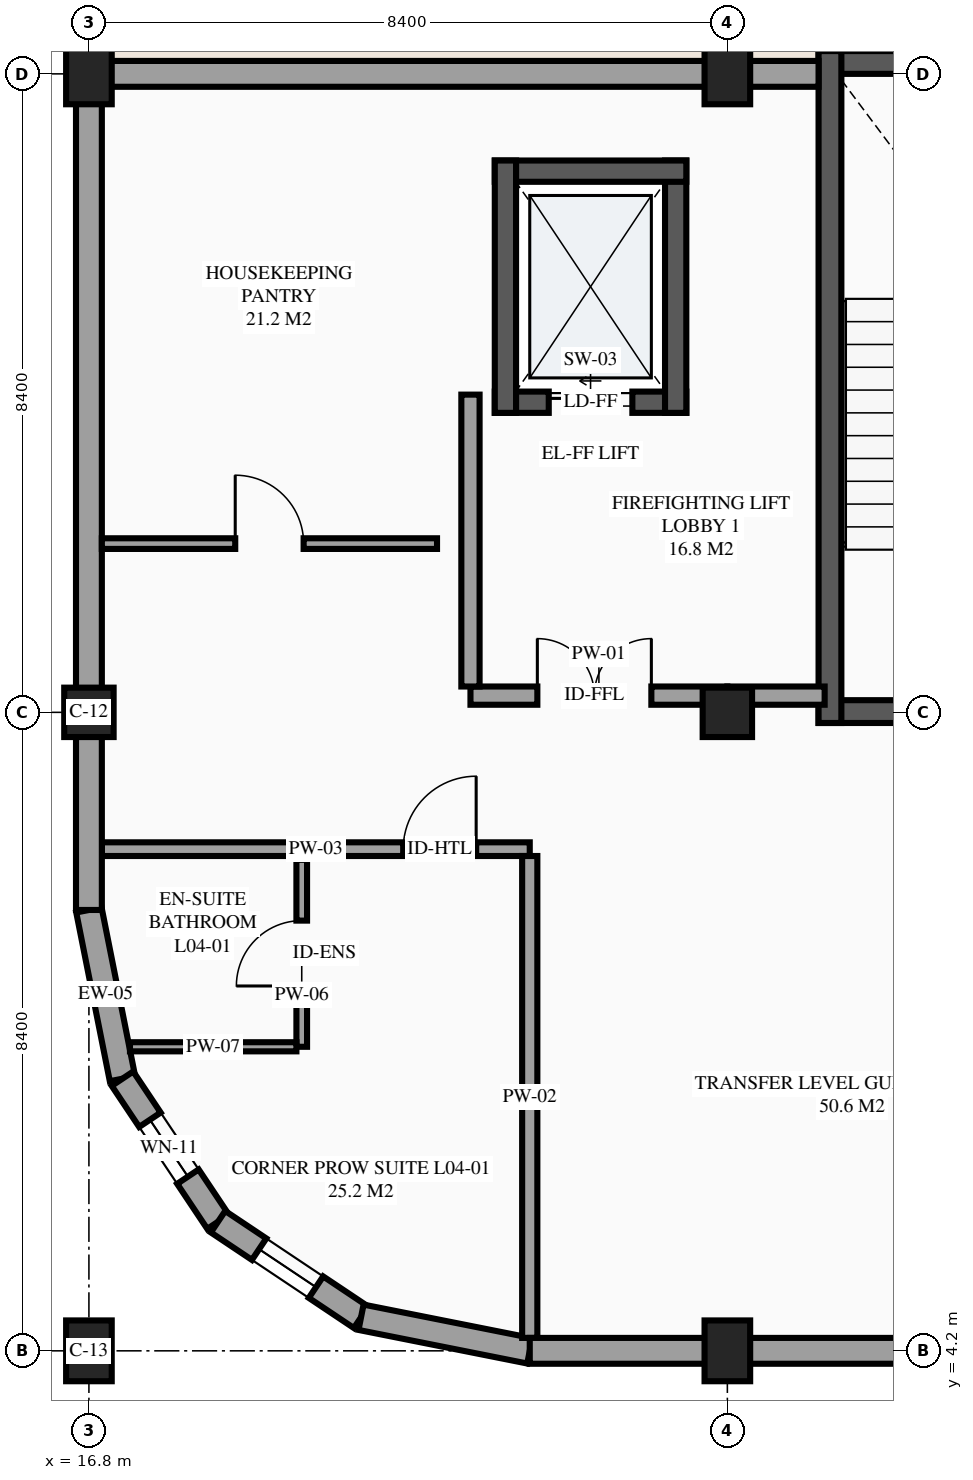
"""IFC4 building model, lengths in metres.
Left out: names, types, materials, properties, quantities, classifications, styles, units other than length and angle.
Written with IfcOpenShell. Run it as: python <this file> out.ifc"""

import sys

from ifc_helpers import new_model, si_unit, direction, frame, frame_2d, origin, origin_2d, place, context, subcontext, project, spatial, rectangle, extrude, element, fill, save


model = new_model("IFC4")
c1 = context("Model", 3, precision=1e-05, world=origin(), true_north=direction((0.0, 1.0)))
c2 = subcontext(c1, "Body", "Model", "MODEL_VIEW")
j1 = project(units=[si_unit("LENGTHUNIT", "METRE"), si_unit("PLANEANGLEUNIT", "RADIAN")], contexts=[c1])
p1 = place(None, origin())
s1 = spatial("IfcSite", under=j1, at=p1, CompositionType="ELEMENT")
p2 = place(p1, origin())
s2 = spatial("IfcBuilding", under=s1, at=p2, CompositionType="ELEMENT")
p3 = place(p2, frame((0.0, 0.0, 18.3)))
s3 = spatial("IfcBuildingStorey", under=s2, at=p3, CompositionType="ELEMENT", Elevation=18.3)
p4 = place(p3, frame((16.8, 4.2, 0.0), z_axis=(0.0, 0.0, 1.0), x_axis=(1.0, 0.0, 0.0)))
e1 = element("IfcColumn", 1, at=p4, inside=s3, PredefinedType="COLUMN", context=c2, shape_type="SweptSolid", body=[
    extrude(rectangle(XDim=0.6, YDim=0.8, at=origin_2d()), origin(), (0.0, 0.0, 1.0), 3.6),
])
p5 = place(p3, frame((16.8, 12.6, 0.0), z_axis=(0.0, 0.0, 1.0), x_axis=(1.0, 0.0, 0.0)))
e2 = element("IfcColumn", 2, at=p5, inside=s3, PredefinedType="COLUMN", context=c2, shape_type="SweptSolid", body=[
    extrude(rectangle(XDim=0.65, YDim=0.65, at=origin_2d()), origin(), (0.0, 0.0, 1.0), 3.6),
])
for number, where, z_axis, x_axis in (
    (3, (16.8, 21.0, 0.0), (0.0, 0.0, 1.0), (1.0, 0.0, 0.0)),
    (4, (25.2, 4.2, 0.0), (0.0, 0.0, 1.0), (1.0, 0.0, 0.0)),
):
    element("IfcColumn", number, at=place(p3, frame(where, z_axis=z_axis, x_axis=x_axis)), inside=s3, PredefinedType="COLUMN", context=c2, shape_type="SweptSolid", body=[
        extrude(rectangle(XDim=0.6, YDim=0.8, at=origin_2d()), origin(), (0.0, 0.0, 1.0), 3.6),
    ])
p6 = place(p3, frame((25.2, 12.6, 0.0), z_axis=(0.0, 0.0, 1.0), x_axis=(1.0, 0.0, 0.0)))
e5 = element("IfcColumn", 5, at=p6, inside=s3, PredefinedType="COLUMN", context=c2, shape_type="SweptSolid", body=[
    extrude(rectangle(XDim=0.65, YDim=0.65, at=origin_2d()), origin(), (0.0, 0.0, 1.0), 3.6),
])
p7 = place(p3, frame((25.2, 21.0, 0.0), z_axis=(0.0, 0.0, 1.0), x_axis=(1.0, 0.0, 0.0)))
e6 = element("IfcColumn", 6, at=p7, inside=s3, PredefinedType="COLUMN", context=c2, shape_type="SweptSolid", body=[
    extrude(rectangle(XDim=0.6, YDim=0.8, at=origin_2d()), origin(), (0.0, 0.0, 1.0), 3.6),
])
p8 = place(p3, frame((16.8, 10.0, 0.0), z_axis=(0.0, 0.0, 1.0), x_axis=(0.195057908159, -0.980791727363, 0.0)))
e7 = element("IfcWall", 7, at=p8, inside=s3, PredefinedType="STANDARD", context=c2, shape_type="SweptSolid", body=[
    extrude(rectangle(XDim=2.263, YDim=0.34, at=frame_2d((1.131, 0.0))), origin(), (0.0, 0.0, 1.0), 2.48),
])
p9 = place(p3, frame((17.241, 7.781, 0.0), z_axis=(0.0, 0.0, 1.0), x_axis=(0.555546297918, -0.831485604728, 0.0)))
e8 = element("IfcWall", 8, at=p9, inside=s3, PredefinedType="STANDARD", context=c2, shape_type="SweptSolid", body=[
    extrude(rectangle(XDim=2.263, YDim=0.34, at=frame_2d((1.132, 0.0))), origin(), (0.0, 0.0, 1.0), 3.6),
])
p10 = place(p9, frame((0.65, 0.0, 0.75)))
e9 = element("IfcOpeningElement", 9, at=p10, cuts=e8, PredefinedType="OPENING", context=c2, shape_type="SweptSolid", body=[
    extrude(rectangle(XDim=0.9, YDim=1.55, at=frame_2d((0.45, 0.775))), frame((0.0, 0.18, 0.0), z_axis=(0.0, -1.0, 0.0), x_axis=(1.0, 0.0, 0.0)), (0.0, 0.0, 1.0), 0.36),
])
p11 = place(p3, frame((18.499, 5.899, 0.0), z_axis=(0.0, 0.0, 1.0), x_axis=(0.831502143458, -0.555521543618, 0.0)))
e10 = element("IfcWall", 10, at=p11, inside=s3, PredefinedType="STANDARD", context=c2, shape_type="SweptSolid", body=[
    extrude(rectangle(XDim=2.263, YDim=0.34, at=frame_2d((1.131, 0.0))), origin(), (0.0, 0.0, 1.0), 3.6),
])
p12 = place(p11, frame((0.65, 0.0, 0.75)))
e11 = element("IfcOpeningElement", 11, at=p12, cuts=e10, PredefinedType="OPENING", context=c2, shape_type="SweptSolid", body=[
    extrude(rectangle(XDim=0.9, YDim=1.55, at=frame_2d((0.45, 0.775))), frame((0.0, 0.18, 0.0), z_axis=(0.0, -1.0, 0.0), x_axis=(1.0, 0.0, 0.0)), (0.0, 0.0, 1.0), 0.36),
])
p13 = place(p3, frame((20.38, 4.642, 0.0), z_axis=(0.0, 0.0, 1.0), x_axis=(0.98077519094, -0.195141038321, 0.0)))
e12 = element("IfcWall", 12, at=p13, inside=s3, PredefinedType="STANDARD", context=c2, shape_type="SweptSolid", body=[
    extrude(rectangle(XDim=2.263, YDim=0.34, at=frame_2d((1.132, 0.0))), origin(), (0.0, 0.0, 1.0), 3.126),
])
p14 = place(p3, frame((25.2, 4.2, 0.0), z_axis=(0.0, 0.0, 1.0), x_axis=(1.0, 0.0, 0.0)))
e13 = element("IfcWall", 13, at=p14, inside=s3, PredefinedType="STANDARD", context=c2, shape_type="SweptSolid", body=[
    extrude(rectangle(XDim=16.8, YDim=0.34, at=frame_2d((8.4, 0.0))), origin(), (0.0, 0.0, 1.0), 2.63),
])
p15 = place(p14, frame((9.209, 0.0, 0.85)))
e14 = element("IfcOpeningElement", 14, at=p15, cuts=e13, PredefinedType="OPENING", context=c2, shape_type="SweptSolid", body=[
    extrude(rectangle(XDim=1.5, YDim=1.5, at=frame_2d((0.75, 0.75))), frame((0.0, 0.18, 0.0), z_axis=(0.0, -1.0, 0.0), x_axis=(1.0, 0.0, 0.0)), (0.0, 0.0, 1.0), 0.36),
])
p16 = place(p14, frame((14.627, 0.0, 0.85)))
e15 = element("IfcOpeningElement", 15, at=p16, cuts=e13, PredefinedType="OPENING", context=c2, shape_type="SweptSolid", body=[
    extrude(rectangle(XDim=1.5, YDim=1.5, at=frame_2d((0.75, 0.75))), frame((0.0, 0.18, 0.0), z_axis=(0.0, -1.0, 0.0), x_axis=(1.0, 0.0, 0.0)), (0.0, 0.0, 1.0), 0.36),
])
p17 = place(p14, frame((2.25, 0.0, 0.75)))
e16 = element("IfcOpeningElement", 16, at=p17, cuts=e13, PredefinedType="OPENING", context=c2, shape_type="SweptSolid", body=[
    extrude(rectangle(XDim=2.1, YDim=1.5, at=frame_2d((1.05, 0.75))), frame((0.0, 0.18, 0.0), z_axis=(0.0, -1.0, 0.0), x_axis=(1.0, 0.0, 0.0)), (0.0, 0.0, 1.0), 0.36),
])
p18 = place(p3, frame((25.2, 21.0, 0.0), z_axis=(0.0, 0.0, 1.0), x_axis=(-1.0, 0.0, 0.0)))
e17 = element("IfcWall", 17, at=p18, inside=s3, PredefinedType="STANDARD", context=c2, shape_type="SweptSolid", body=[
    extrude(rectangle(XDim=8.4, YDim=0.34, at=frame_2d((4.2, 0.0))), origin(), (0.0, 0.0, 1.0), 2.88),
])
p19 = place(p3, frame((16.8, 21.0, 0.0), z_axis=(0.0, 0.0, 1.0), x_axis=(0.0, -1.0, 0.0)))
e18 = element("IfcWall", 18, at=p19, inside=s3, PredefinedType="STANDARD", context=c2, shape_type="SweptSolid", body=[
    extrude(rectangle(XDim=8.4, YDim=0.34, at=frame_2d((4.2, 0.0))), origin(), (0.0, 0.0, 1.0), 2.58),
])
p20 = place(p3, frame((22.14, 16.68, 0.0), z_axis=(0.0, 0.0, 1.0), x_axis=(1.0, 0.0, 0.0)))
e19 = element("IfcWall", 19, at=p20, inside=s3, PredefinedType="SHEAR", context=c2, shape_type="SweptSolid", body=[
    extrude(rectangle(XDim=2.52, YDim=0.28, at=frame_2d((1.26, 0.0))), origin(), (0.0, 0.0, 1.0), 3.6),
])
p21 = place(p20, frame((0.71, 0.0, 0.0)))
e20 = element("IfcOpeningElement", 20, at=p21, cuts=e19, PredefinedType="OPENING", context=c2, shape_type="SweptSolid", body=[
    extrude(rectangle(XDim=1.1, YDim=2.2, at=frame_2d((0.55, 1.1))), frame((0.0, 0.15, 0.0), z_axis=(0.0, -1.0, 0.0), x_axis=(1.0, 0.0, 0.0)), (0.0, 0.0, 1.0), 0.3),
])
p22 = place(p3, frame((24.52, 16.54, 0.0), z_axis=(0.0, 0.0, 1.0), x_axis=(0.0, 1.0, 0.0)))
e21 = element("IfcWall", 21, at=p22, inside=s3, PredefinedType="SHEAR", context=c2, shape_type="SweptSolid", body=[
    extrude(rectangle(XDim=3.32, YDim=0.28, at=frame_2d((1.66, 0.0))), origin(), (0.0, 0.0, 1.0), 3.6),
])
p23 = place(p3, frame((24.66, 19.72, 0.0), z_axis=(0.0, 0.0, 1.0), x_axis=(-1.0, 0.0, 0.0)))
e22 = element("IfcWall", 22, at=p23, inside=s3, PredefinedType="SHEAR", context=c2, shape_type="SweptSolid", body=[
    extrude(rectangle(XDim=2.52, YDim=0.28, at=frame_2d((1.26, 0.0))), origin(), (0.0, 0.0, 1.0), 3.6),
])
p24 = place(p3, frame((22.28, 19.86, 0.0), z_axis=(0.0, 0.0, 1.0), x_axis=(0.0, -1.0, 0.0)))
e23 = element("IfcWall", 23, at=p24, inside=s3, PredefinedType="SHEAR", context=c2, shape_type="SweptSolid", body=[
    extrude(rectangle(XDim=3.32, YDim=0.28, at=frame_2d((1.66, 0.0))), origin(), (0.0, 0.0, 1.0), 3.6),
])
p25 = place(p3, frame((26.4, 12.61, 0.0), z_axis=(0.0, 0.0, 1.0), x_axis=(1.0, 0.0, 0.0)))
e24 = element("IfcWall", 24, at=p25, inside=s3, PredefinedType="SHEAR", context=c2, shape_type="SweptSolid", body=[
    extrude(rectangle(XDim=5.2, YDim=0.3, at=frame_2d((2.6, 0.0))), origin(), (0.0, 0.0, 1.0), 3.6),
])
p26 = place(p25, frame((2.025, 0.0, 0.0)))
e25 = element("IfcOpeningElement", 25, at=p26, cuts=e24, PredefinedType="OPENING", context=c2, shape_type="SweptSolid", body=[
    extrude(rectangle(XDim=1.15, YDim=2.15, at=frame_2d((0.575, 1.075))), frame((0.0, 0.16, 0.0), z_axis=(0.0, -1.0, 0.0), x_axis=(1.0, 0.0, 0.0)), (0.0, 0.0, 1.0), 0.32),
])
p27 = place(p3, frame((31.6, 21.15, 0.0), z_axis=(0.0, 0.0, 1.0), x_axis=(-1.0, 0.0, 0.0)))
e26 = element("IfcWall", 26, at=p27, inside=s3, PredefinedType="SHEAR", context=c2, shape_type="SweptSolid", body=[
    extrude(rectangle(XDim=5.2, YDim=0.3, at=frame_2d((2.6, 0.0))), origin(), (0.0, 0.0, 1.0), 3.6),
])
p28 = place(p3, frame((26.55, 21.3, 0.0), z_axis=(0.0, 0.0, 1.0), x_axis=(0.0, -1.0, 0.0)))
e27 = element("IfcWall", 27, at=p28, inside=s3, PredefinedType="SHEAR", context=c2, shape_type="SweptSolid", body=[
    extrude(rectangle(XDim=8.84, YDim=0.3, at=frame_2d((4.42, 0.0))), origin(), (0.0, 0.0, 1.0), 3.6),
])
p29 = place(p3, frame((16.97, 10.8, 0.0), z_axis=(0.0, 0.0, 1.0), x_axis=(1.0, 0.0, 0.0)))
e28 = element("IfcWall", 28, at=p29, inside=s3, PredefinedType="PARTITIONING", context=c2, shape_type="SweptSolid", body=[
    extrude(rectangle(XDim=5.63, YDim=0.18, at=frame_2d((2.815, 0.0))), origin(), (0.0, 0.0, 1.0), 3.375),
])
p30 = place(p29, frame((3.965, 0.0, 0.0)))
e29 = element("IfcOpeningElement", 29, at=p30, cuts=e28, PredefinedType="OPENING", context=c2, shape_type="SweptSolid", body=[
    extrude(rectangle(XDim=0.96, YDim=2.15, at=frame_2d((0.48, 1.075))), frame((0.0, 0.1, 0.0), z_axis=(0.0, -1.0, 0.0), x_axis=(1.0, 0.0, 0.0)), (0.0, 0.0, 1.0), 0.2),
])
p31 = place(p3, frame((22.6, 4.37, 0.0), z_axis=(0.0, 0.0, 1.0), x_axis=(0.0, 1.0, 0.0)))
e30 = element("IfcWall", 30, at=p31, inside=s3, PredefinedType="PARTITIONING", context=c2, shape_type="SweptSolid", body=[
    extrude(rectangle(XDim=6.34, YDim=0.2, at=frame_2d((3.17, 0.0))), origin(), (0.0, 0.0, 1.0), 3.375),
])
p32 = place(p3, frame((19.6, 8.2, 0.0), z_axis=(0.0, 0.0, 1.0), x_axis=(0.0, 1.0, 0.0)))
e31 = element("IfcWall", 31, at=p32, inside=s3, PredefinedType="PARTITIONING", context=c2, shape_type="SweptSolid", body=[
    extrude(rectangle(XDim=2.46, YDim=0.14, at=frame_2d((1.23, 0.0))), origin(), (0.0, 0.0, 1.0), 3.375),
])
p33 = place(p32, frame((0.8, 0.0, 0.0)))
e32 = element("IfcOpeningElement", 32, at=p33, cuts=e31, PredefinedType="OPENING", context=c2, shape_type="SweptSolid", body=[
    extrude(rectangle(XDim=0.86, YDim=2.1, at=frame_2d((0.43, 1.05))), frame((0.0, 0.08, 0.0), z_axis=(0.0, -1.0, 0.0), x_axis=(1.0, 0.0, 0.0)), (0.0, 0.0, 1.0), 0.16),
])
p34 = place(p3, frame((17.34, 8.2, 0.0), z_axis=(0.0, 0.0, 1.0), x_axis=(1.0, 0.0, 0.0)))
e33 = element("IfcWall", 33, at=p34, inside=s3, PredefinedType="PARTITIONING", context=c2, shape_type="SweptSolid", body=[
    extrude(rectangle(XDim=2.19, YDim=0.12, at=frame_2d((1.095, 0.0))), origin(), (0.0, 0.0, 1.0), 3.375),
])
p35 = place(p3, frame((21.82, 12.82, 0.0), z_axis=(0.0, 0.0, 1.0), x_axis=(1.0, 0.0, 0.0)))
e34 = element("IfcWall", 34, at=p35, inside=s3, PredefinedType="PARTITIONING", context=c2, shape_type="SweptSolid", body=[
    extrude(rectangle(XDim=3.38, YDim=0.24, at=frame_2d((1.69, 0.0))), origin(), (0.0, 0.0, 1.0), 2.48),
])
p36 = place(p35, frame((0.88, 0.0, 0.0)))
e35 = element("IfcOpeningElement", 35, at=p36, cuts=e34, PredefinedType="OPENING", context=c2, shape_type="SweptSolid", body=[
    extrude(rectangle(XDim=1.5, YDim=2.15, at=frame_2d((0.75, 1.075))), frame((0.0, 0.13, 0.0), z_axis=(0.0, -1.0, 0.0), x_axis=(1.0, 0.0, 0.0)), (0.0, 0.0, 1.0), 0.26),
])
p37 = place(p3, frame((21.82, 12.94, 0.0), z_axis=(0.0, 0.0, 1.0), x_axis=(0.0, 1.0, 0.0)))
e36 = element("IfcWall", 36, at=p37, inside=s3, PredefinedType="PARTITIONING", context=c2, shape_type="SweptSolid", body=[
    extrude(rectangle(XDim=3.84, YDim=0.24, at=frame_2d((1.92, 0.0))), origin(), (0.0, 0.0, 1.0), 3.375),
])
p38 = place(p3, frame((16.97, 14.82, 0.0), z_axis=(0.0, 0.0, 1.0), x_axis=(1.0, 0.0, 0.0)))
e37 = element("IfcWall", 37, at=p38, inside=s3, PredefinedType="PARTITIONING", context=c2, shape_type="SweptSolid", body=[
    extrude(rectangle(XDim=4.41, YDim=0.14, at=frame_2d((2.205, 0.0))), origin(), (0.0, 0.0, 1.0), 3.375),
])
p39 = place(p38, frame((1.755, 0.0, 0.0)))
e38 = element("IfcOpeningElement", 38, at=p39, cuts=e37, PredefinedType="OPENING", context=c2, shape_type="SweptSolid", body=[
    extrude(rectangle(XDim=0.9, YDim=2.12, at=frame_2d((0.45, 1.06))), frame((0.0, 0.08, 0.0), z_axis=(0.0, -1.0, 0.0), x_axis=(1.0, 0.0, 0.0)), (0.0, 0.0, 1.0), 0.16),
])
p40 = place(p3, frame((22.6, 4.2, 0.0), z_axis=(0.0, 0.0, 1.0), x_axis=(1.0, 0.0, 0.0)))
e39 = element("IfcWall", 39, at=p40, inside=s3, PredefinedType="STANDARD", context=c2, shape_type="SweptSolid", body=[
    extrude(rectangle(XDim=2.6, YDim=0.34, at=frame_2d((1.3, 0.0))), origin(), (0.0, 0.0, 1.0), 3.126),
])
p41 = place(p3, frame((26.4, 21.0, 0.0), z_axis=(0.0, 0.0, 1.0), x_axis=(-1.0, 0.0, 0.0)))
e40 = element("IfcWall", 40, at=p41, inside=s3, PredefinedType="STANDARD", context=c2, shape_type="SweptSolid", body=[
    extrude(rectangle(XDim=1.2, YDim=0.34, at=frame_2d((0.6, 0.0))), origin(), (0.0, 0.0, 1.0), 2.53),
])
p42 = place(p3, frame((16.8, 12.6, 0.0), z_axis=(0.0, 0.0, 1.0), x_axis=(0.0, -1.0, 0.0)))
e41 = element("IfcWall", 41, at=p42, inside=s3, PredefinedType="STANDARD", context=c2, shape_type="SweptSolid", body=[
    extrude(rectangle(XDim=2.6, YDim=0.34, at=frame_2d((1.3, 0.0))), origin(), (0.0, 0.0, 1.0), 2.48),
])
p43 = place(p3, frame((25.2, 12.82, 0.0), z_axis=(0.0, 0.0, 1.0), x_axis=(1.0, 0.0, 0.0)))
e42 = element("IfcWall", 42, at=p43, inside=s3, PredefinedType="PARTITIONING", context=c2, shape_type="SweptSolid", body=[
    extrude(rectangle(XDim=1.28, YDim=0.24, at=frame_2d((0.64, 0.0))), origin(), (0.0, 0.0, 1.0), 2.58),
])
p44 = place(p10, origin())
e43 = element("IfcWindow", 43, at=p44, inside=s3, PartitioningType="SINGLE_PANEL", PredefinedType="WINDOW", context=c2, shape_type="SweptSolid", body=[
    extrude(rectangle(XDim=0.9, YDim=1.55, at=frame_2d((0.45, 0.775))), frame((0.0, 0.03, 0.0), z_axis=(0.0, -1.0, 0.0), x_axis=(1.0, 0.0, 0.0)), (0.0, 0.0, 1.0), 0.06),
])
fill(e9, e43)
p45 = place(p12, origin())
e44 = element("IfcWindow", 44, at=p45, inside=s3, PartitioningType="SINGLE_PANEL", PredefinedType="WINDOW", context=c2, shape_type="SweptSolid", body=[
    extrude(rectangle(XDim=0.9, YDim=1.55, at=frame_2d((0.45, 0.775))), frame((0.0, 0.03, 0.0), z_axis=(0.0, -1.0, 0.0), x_axis=(1.0, 0.0, 0.0)), (0.0, 0.0, 1.0), 0.06),
])
fill(e11, e44)
p46 = place(p21, origin())
e45 = element("IfcDoor", 45, at=p46, inside=s3, OperationType="SLIDING_TO_LEFT", PredefinedType="DOOR", context=c2, shape_type="SweptSolid", body=[
    extrude(rectangle(XDim=1.1, YDim=2.2, at=frame_2d((0.55, 1.1))), frame((0.0, 0.025, 0.0), z_axis=(0.0, -1.0, 0.0), x_axis=(1.0, 0.0, 0.0)), (0.0, 0.0, 1.0), 0.05),
])
fill(e20, e45)
p47 = place(p30, origin())
e46 = element("IfcDoor", 46, at=p47, inside=s3, OperationType="SINGLE_SWING_RIGHT", PredefinedType="DOOR", context=c2, shape_type="SweptSolid", body=[
    extrude(rectangle(XDim=0.96, YDim=2.15, at=frame_2d((0.48, 1.075))), frame((0.0, 0.025, 0.0), z_axis=(0.0, -1.0, 0.0), x_axis=(1.0, 0.0, 0.0)), (0.0, 0.0, 1.0), 0.05),
])
fill(e29, e46)
p48 = place(p33, origin())
e47 = element("IfcDoor", 47, at=p48, inside=s3, OperationType="SINGLE_SWING_LEFT", PredefinedType="DOOR", context=c2, shape_type="SweptSolid", body=[
    extrude(rectangle(XDim=0.86, YDim=2.1, at=frame_2d((0.43, 1.05))), frame((0.0, 0.025, 0.0), z_axis=(0.0, -1.0, 0.0), x_axis=(1.0, 0.0, 0.0)), (0.0, 0.0, 1.0), 0.05),
])
fill(e32, e47)
p49 = place(p36, origin())
e48 = element("IfcDoor", 48, at=p49, inside=s3, OperationType="DOUBLE_DOOR_SINGLE_SWING", PredefinedType="DOOR", context=c2, shape_type="SweptSolid", body=[
    extrude(rectangle(XDim=1.5, YDim=2.15, at=frame_2d((0.75, 1.075))), frame((0.0, 0.025, 0.0), z_axis=(0.0, -1.0, 0.0), x_axis=(1.0, 0.0, 0.0)), (0.0, 0.0, 1.0), 0.05),
])
fill(e35, e48)
p50 = place(p39, origin())
e49 = element("IfcDoor", 49, at=p50, inside=s3, OperationType="SINGLE_SWING_LEFT", PredefinedType="DOOR", context=c2, shape_type="SweptSolid", body=[
    extrude(rectangle(XDim=0.9, YDim=2.12, at=frame_2d((0.45, 1.06))), frame((0.0, 0.025, 0.0), z_axis=(0.0, -1.0, 0.0), x_axis=(1.0, 0.0, 0.0)), (0.0, 0.0, 1.0), 0.05),
])
fill(e38, e49)
save(model, sys.argv[1])
